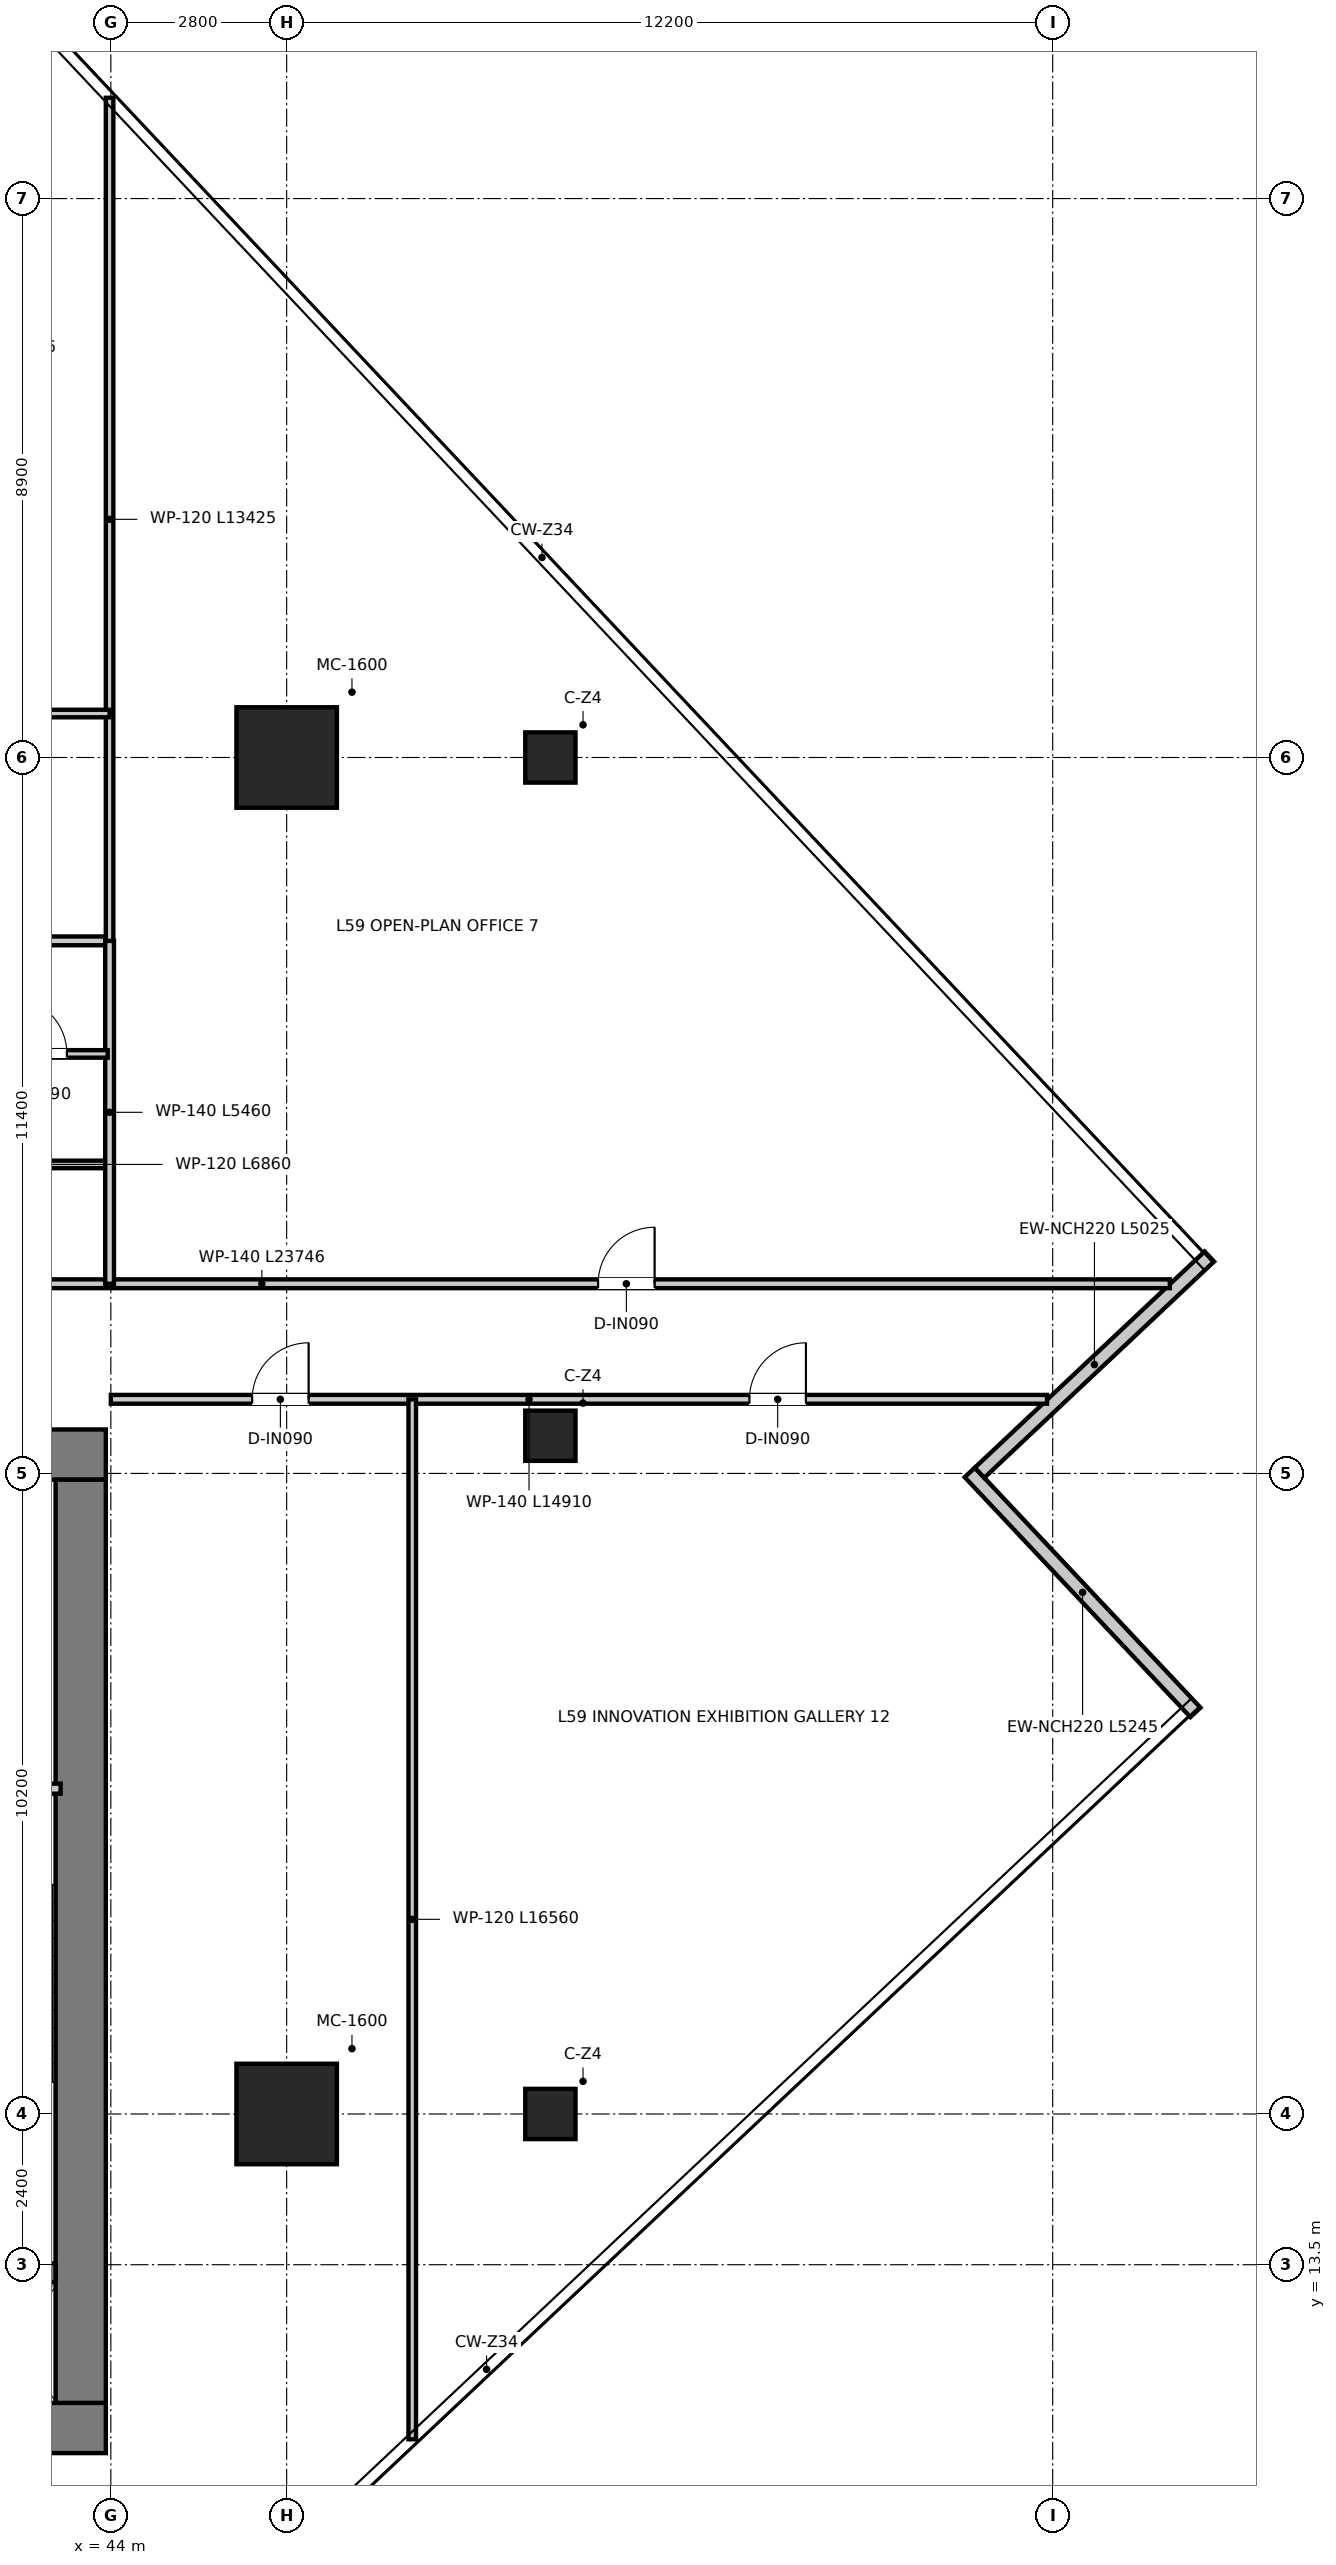
"""IFC4 building model, lengths in metres.
Left out: names, types, materials, properties, quantities, classifications, styles, units other than length and angle.
Written with IfcOpenShell. Run it as: python <this file> out.ifc"""

import sys

from ifc_helpers import new_model, si_unit, direction, frame, frame_2d, origin, origin_2d, place, context, subcontext, project, spatial, rectangle, extrude, source, transform, mapped, element, fill, save


model = new_model("IFC4")
c1 = context("Model", 3, precision=1e-05, world=origin(), true_north=direction((0.0, 1.0)))
c2 = subcontext(c1, "Body", "Model", "MODEL_VIEW")
j1 = project(units=[si_unit("LENGTHUNIT", "METRE"), si_unit("PLANEANGLEUNIT", "RADIAN")], contexts=[c1])
p1 = place(None, origin())
s1 = spatial("IfcSite", under=j1, at=p1, CompositionType="ELEMENT")
p2 = place(p1, origin())
s2 = spatial("IfcBuilding", under=s1, at=p2, CompositionType="ELEMENT")
p3 = place(p2, frame((0.0, 0.0, 242.85)))
s3 = spatial("IfcBuildingStorey", under=s2, at=p3, CompositionType="ELEMENT", Elevation=242.85)
p4 = place(p3, frame((28.08, 10.9, 0.0), z_axis=(0.0, 0.0, 1.0), x_axis=(1.0, 0.0, 0.0)))
e1 = element("IfcWall", 1, at=p4, inside=s3, PredefinedType="SHEAR", context=c2, shape_type="SweptSolid", body=[
    extrude(rectangle(XDim=15.84, YDim=0.8, at=frame_2d((7.92, 0.0))), origin(), (0.0, 0.0, 1.0), 3.95),
])
p5 = place(p3, frame((28.08, 26.4, 0.0), z_axis=(0.0, 0.0, 1.0), x_axis=(1.0, 0.0, 0.0)))
e2 = element("IfcWall", 2, at=p5, inside=s3, PredefinedType="SHEAR", context=c2, shape_type="SweptSolid", body=[
    extrude(rectangle(XDim=15.84, YDim=0.8, at=frame_2d((7.92, 0.0))), origin(), (0.0, 0.0, 1.0), 3.95),
])
p6 = place(p5, frame((7.22, 0.0, 0.0)))
e3 = element("IfcOpeningElement", 3, at=p6, cuts=e2, PredefinedType="OPENING", context=c2, shape_type="SweptSolid", body=[
    extrude(rectangle(XDim=1.4, YDim=2.2, at=frame_2d((0.7, 1.1))), frame((0.0, 0.41, 0.0), z_axis=(0.0, -1.0, 0.0), x_axis=(1.0, 0.0, 0.0)), (0.0, 0.0, 1.0), 0.82),
])
p7 = place(p5, frame((1.775, 0.0, 0.0)))
e4 = element("IfcOpeningElement", 4, at=p7, cuts=e2, PredefinedType="OPENING", context=c2, shape_type="SweptSolid", body=[
    extrude(rectangle(XDim=1.05, YDim=2.1, at=frame_2d((0.525, 1.05))), frame((0.0, 0.41, 0.0), z_axis=(0.0, -1.0, 0.0), x_axis=(1.0, 0.0, 0.0)), (0.0, 0.0, 1.0), 0.82),
])
p8 = place(p5, frame((13.015, 0.0, 0.0)))
e5 = element("IfcOpeningElement", 5, at=p8, cuts=e2, PredefinedType="OPENING", context=c2, shape_type="SweptSolid", body=[
    extrude(rectangle(XDim=1.05, YDim=2.1, at=frame_2d((0.525, 1.05))), frame((0.0, 0.41, 0.0), z_axis=(0.0, -1.0, 0.0), x_axis=(1.0, 0.0, 0.0)), (0.0, 0.0, 1.0), 0.82),
])
p9 = place(p3, frame((43.52, 11.3, 0.0), z_axis=(0.0, 0.0, 1.0), x_axis=(0.0, 1.0, 0.0)))
e6 = element("IfcWall", 6, at=p9, inside=s3, PredefinedType="SHEAR", context=c2, shape_type="SweptSolid", body=[
    extrude(rectangle(XDim=14.7, YDim=0.8, at=frame_2d((7.35, 0.0))), origin(), (0.0, 0.0, 1.0), 3.95),
])
p10 = place(p3, frame((40.02, 13.37, 0.0), z_axis=(0.0, 0.0, 1.0), x_axis=(1.0, 0.0, 0.0)))
e7 = element("IfcWall", 7, at=p10, inside=s3, PredefinedType="SHEAR", context=c2, shape_type="SweptSolid", body=[
    extrude(rectangle(XDim=3.1, YDim=0.3, at=frame_2d((1.55, 0.0))), origin(), (0.0, 0.0, 1.0), 3.95),
])
m1 = source(origin(), c2, "Body", "SweptSolid", [
    extrude(rectangle(XDim=1.6, YDim=1.6, at=origin_2d()), origin(), (0.0, 0.0, 1.0), 3.95),
])
for number, where, z_axis, x_axis in (
    (8, (46.8, 15.9, 0.0), (0.0, 0.0, 1.0), (1.0, 0.0, 0.0)),
    (9, (46.8, 37.5, 0.0), (0.0, 0.0, 1.0), (1.0, 0.0, 0.0)),
):
    element("IfcColumn", number, at=place(p3, frame(where, z_axis=z_axis, x_axis=x_axis)), inside=s3, PredefinedType="USERDEFINED", context=c2, shape_type="MappedRepresentation", body=[
        mapped(m1, transform((0.0, 0.0, 0.0), x_axis=(1.0, 0.0, 0.0), y_axis=(0.0, 1.0, 0.0), z_axis=(0.0, 0.0, 1.0), scale=1.0)),
    ])
m2 = source(origin(), c2, "Body", "SweptSolid", [
    extrude(rectangle(XDim=0.8, YDim=0.8, at=origin_2d()), origin(), (0.0, 0.0, 1.0), 3.95),
])
for number, where, z_axis, x_axis in (
    (10, (51.0, 37.5, 0.0), (0.0, 0.0, 1.0), (1.0, 0.0, 0.0)),
    (11, (51.0, 26.7, 0.0), (0.0, 0.0, 1.0), (1.0, 0.0, 0.0)),
    (12, (51.0, 15.9, 0.0), (0.0, 0.0, 1.0), (1.0, 0.0, 0.0)),
):
    element("IfcColumn", number, at=place(p3, frame(where, z_axis=z_axis, x_axis=x_axis)), inside=s3, PredefinedType="COLUMN", context=c2, shape_type="MappedRepresentation", body=[
        mapped(m2, transform((0.0, 0.0, 0.0), x_axis=(1.0, 0.0, 0.0), y_axis=(0.0, 1.0, 0.0), z_axis=(0.0, 0.0, 1.0), scale=1.0)),
    ])
p11 = place(p3, frame((61.273, 22.295, 0.0), z_axis=(0.0, 0.0, 1.0), x_axis=(-0.685178828418, 0.728374884992, 0.0)))
e13 = element("IfcWall", 13, at=p11, inside=s3, PredefinedType="ELEMENTEDWALL", context=c2, shape_type="SweptSolid", body=[
    extrude(rectangle(XDim=5.245, YDim=0.22, at=frame_2d((2.623, 0.0))), origin(), (0.0, 0.0, 1.0), 3.67),
])
p12 = place(p3, frame((57.835, 26.111, 0.0), z_axis=(0.0, 0.0, 1.0), x_axis=(0.728372554527, 0.685181305796, 0.0)))
e14 = element("IfcWall", 14, at=p12, inside=s3, PredefinedType="ELEMENTEDWALL", context=c2, shape_type="SweptSolid", body=[
    extrude(rectangle(XDim=5.025, YDim=0.22, at=frame_2d((2.513, 0.0))), origin(), (0.0, 0.0, 1.0), 3.67),
])
p13 = place(p3, frame((40.04, 21.08, 0.0), z_axis=(0.0, 0.0, 1.0), x_axis=(1.0, 0.0, 0.0)))
e15 = element("IfcWall", 15, at=p13, inside=s3, PredefinedType="PARTITIONING", context=c2, shape_type="SweptSolid", body=[
    extrude(rectangle(XDim=3.16, YDim=0.16, at=frame_2d((1.58, 0.0))), origin(), (0.0, 0.0, 1.0), 3.67),
])
p14 = place(p13, frame((1.055, 0.0, 0.0)))
e16 = element("IfcOpeningElement", 16, at=p14, cuts=e15, PredefinedType="OPENING", context=c2, shape_type="SweptSolid", body=[
    extrude(rectangle(XDim=1.05, YDim=2.1, at=frame_2d((0.525, 1.05))), frame((0.0, 0.09, 0.0), z_axis=(0.0, -1.0, 0.0), x_axis=(1.0, 0.0, 0.0)), (0.0, 0.0, 1.0), 0.18),
])
p15 = place(p3, frame((37.12, 29.12, 0.0), z_axis=(0.0, 0.0, 1.0), x_axis=(1.0, 0.0, 0.0)))
e17 = element("IfcWall", 17, at=p15, inside=s3, PredefinedType="PARTITIONING", context=c2, shape_type="SweptSolid", body=[
    extrude(rectangle(XDim=23.746, YDim=0.14, at=frame_2d((11.873, 0.0))), origin(), (0.0, 0.0, 1.0), 3.03),
])
p16 = place(p15, frame((3.03, 0.0, 0.0)))
e18 = element("IfcOpeningElement", 18, at=p16, cuts=e17, PredefinedType="OPENING", context=c2, shape_type="SweptSolid", body=[
    extrude(rectangle(XDim=0.9, YDim=2.1, at=frame_2d((0.45, 1.05))), frame((0.0, 0.08, 0.0), z_axis=(0.0, -1.0, 0.0), x_axis=(1.0, 0.0, 0.0)), (0.0, 0.0, 1.0), 0.16),
])
p17 = place(p15, frame((14.64, 0.0, 0.0)))
e19 = element("IfcOpeningElement", 19, at=p17, cuts=e17, PredefinedType="OPENING", context=c2, shape_type="SweptSolid", body=[
    extrude(rectangle(XDim=0.9, YDim=2.1, at=frame_2d((0.45, 1.05))), frame((0.0, 0.08, 0.0), z_axis=(0.0, -1.0, 0.0), x_axis=(1.0, 0.0, 0.0)), (0.0, 0.0, 1.0), 0.16),
])
p18 = place(p3, frame((44.0, 27.28, 0.0), z_axis=(0.0, 0.0, 1.0), x_axis=(1.0, 0.0, 0.0)))
e20 = element("IfcWall", 20, at=p18, inside=s3, PredefinedType="PARTITIONING", context=c2, shape_type="SweptSolid", body=[
    extrude(rectangle(XDim=14.91, YDim=0.14, at=frame_2d((7.455, 0.0))), origin(), (0.0, 0.0, 1.0), 3.03),
])
p19 = place(p18, frame((2.25, 0.0, 0.0)))
e21 = element("IfcOpeningElement", 21, at=p19, cuts=e20, PredefinedType="OPENING", context=c2, shape_type="SweptSolid", body=[
    extrude(rectangle(XDim=0.9, YDim=2.1, at=frame_2d((0.45, 1.05))), frame((0.0, 0.08, 0.0), z_axis=(0.0, -1.0, 0.0), x_axis=(1.0, 0.0, 0.0)), (0.0, 0.0, 1.0), 0.16),
])
p20 = place(p18, frame((10.17, 0.0, 0.0)))
e22 = element("IfcOpeningElement", 22, at=p20, cuts=e20, PredefinedType="OPENING", context=c2, shape_type="SweptSolid", body=[
    extrude(rectangle(XDim=0.9, YDim=2.1, at=frame_2d((0.45, 1.05))), frame((0.0, 0.08, 0.0), z_axis=(0.0, -1.0, 0.0), x_axis=(1.0, 0.0, 0.0)), (0.0, 0.0, 1.0), 0.16),
])
p21 = place(p3, frame((37.12, 31.02, 0.0), z_axis=(0.0, 0.0, 1.0), x_axis=(1.0, 0.0, 0.0)))
e23 = element("IfcWall", 23, at=p21, inside=s3, PredefinedType="PARTITIONING", context=c2, shape_type="SweptSolid", body=[
    extrude(rectangle(XDim=6.86, YDim=0.12, at=frame_2d((3.43, 0.0))), origin(), (0.0, 0.0, 1.0), 3.18),
])
p22 = place(p3, frame((37.12, 34.58, 0.0), z_axis=(0.0, 0.0, 1.0), x_axis=(1.0, 0.0, 0.0)))
e24 = element("IfcWall", 24, at=p22, inside=s3, PredefinedType="PARTITIONING", context=c2, shape_type="SweptSolid", body=[
    extrude(rectangle(XDim=6.86, YDim=0.14, at=frame_2d((3.43, 0.0))), origin(), (0.0, 0.0, 1.0), 3.18),
])
p23 = place(p3, frame((43.98, 29.12, 0.0), z_axis=(0.0, 0.0, 1.0), x_axis=(0.0, 1.0, 0.0)))
e25 = element("IfcWall", 25, at=p23, inside=s3, PredefinedType="PARTITIONING", context=c2, shape_type="SweptSolid", body=[
    extrude(rectangle(XDim=5.46, YDim=0.14, at=frame_2d((2.73, 0.0))), origin(), (0.0, 0.0, 1.0), 3.37),
])
p24 = place(p3, frame((37.15, 32.78, 0.0), z_axis=(0.0, 0.0, 1.0), x_axis=(1.0, 0.0, 0.0)))
e26 = element("IfcWall", 26, at=p24, inside=s3, PredefinedType="PARTITIONING", context=c2, shape_type="SweptSolid", body=[
    extrude(rectangle(XDim=6.8, YDim=0.12, at=frame_2d((3.4, 0.0))), origin(), (0.0, 0.0, 1.0), 3.18),
])
p25 = place(p24, frame((0.725, 0.0, 0.0)))
e27 = element("IfcOpeningElement", 27, at=p25, cuts=e26, PredefinedType="OPENING", context=c2, shape_type="SweptSolid", body=[
    extrude(rectangle(XDim=0.85, YDim=2.1, at=frame_2d((0.425, 1.05))), frame((0.0, 0.07, 0.0), z_axis=(0.0, -1.0, 0.0), x_axis=(1.0, 0.0, 0.0)), (0.0, 0.0, 1.0), 0.14),
])
p26 = place(p24, frame((3.065, 0.0, 0.0)))
e28 = element("IfcOpeningElement", 28, at=p26, cuts=e26, PredefinedType="OPENING", context=c2, shape_type="SweptSolid", body=[
    extrude(rectangle(XDim=0.85, YDim=2.1, at=frame_2d((0.425, 1.05))), frame((0.0, 0.07, 0.0), z_axis=(0.0, -1.0, 0.0), x_axis=(1.0, 0.0, 0.0)), (0.0, 0.0, 1.0), 0.14),
])
p27 = place(p24, frame((5.25, 0.0, 0.0)))
e29 = element("IfcOpeningElement", 29, at=p27, cuts=e26, PredefinedType="OPENING", context=c2, shape_type="SweptSolid", body=[
    extrude(rectangle(XDim=0.9, YDim=2.1, at=frame_2d((0.45, 1.05))), frame((0.0, 0.07, 0.0), z_axis=(0.0, -1.0, 0.0), x_axis=(1.0, 0.0, 0.0)), (0.0, 0.0, 1.0), 0.14),
])
p28 = place(p3, frame((43.98, 34.58, 0.0), z_axis=(0.0, 0.0, 1.0), x_axis=(0.0, 1.0, 0.0)))
e30 = element("IfcWall", 30, at=p28, inside=s3, PredefinedType="PARTITIONING", context=c2, shape_type="SweptSolid", body=[
    extrude(rectangle(XDim=13.425, YDim=0.12, at=frame_2d((6.712, 0.0))), origin(), (0.0, 0.0, 1.0), 3.03),
])
p29 = place(p3, frame((37.12, 38.2, 0.0), z_axis=(0.0, 0.0, 1.0), x_axis=(1.0, 0.0, 0.0)))
e31 = element("IfcWall", 31, at=p29, inside=s3, PredefinedType="PARTITIONING", context=c2, shape_type="SweptSolid", body=[
    extrude(rectangle(XDim=6.86, YDim=0.12, at=frame_2d((3.43, 0.0))), origin(), (0.0, 0.0, 1.0), 3.18),
])
p30 = place(p3, frame((48.8, 10.719, 0.0), z_axis=(0.0, 0.0, 1.0), x_axis=(0.0, 1.0, 0.0)))
e32 = element("IfcWall", 32, at=p30, inside=s3, PredefinedType="PARTITIONING", context=c2, shape_type="SweptSolid", body=[
    extrude(rectangle(XDim=16.561, YDim=0.12, at=frame_2d((8.28, 0.0))), origin(), (0.0, 0.0, 1.0), 3.18),
])
p31 = place(p27, origin())
e33 = element("IfcDoor", 33, at=p31, inside=s3, OperationType="SINGLE_SWING_LEFT", PredefinedType="DOOR", context=c2, shape_type="SweptSolid", body=[
    extrude(rectangle(XDim=0.9, YDim=2.1, at=frame_2d((0.45, 1.05))), frame((0.0, 0.025, 0.0), z_axis=(0.0, -1.0, 0.0), x_axis=(1.0, 0.0, 0.0)), (0.0, 0.0, 1.0), 0.05),
])
fill(e29, e33)
p32 = place(p17, origin())
e34 = element("IfcDoor", 34, at=p32, inside=s3, OperationType="SINGLE_SWING_RIGHT", PredefinedType="DOOR", context=c2, shape_type="SweptSolid", body=[
    extrude(rectangle(XDim=0.9, YDim=2.1, at=frame_2d((0.45, 1.05))), frame((0.0, 0.025, 0.0), z_axis=(0.0, -1.0, 0.0), x_axis=(1.0, 0.0, 0.0)), (0.0, 0.0, 1.0), 0.05),
])
fill(e19, e34)
p33 = place(p19, origin())
e35 = element("IfcDoor", 35, at=p33, inside=s3, OperationType="SINGLE_SWING_RIGHT", PredefinedType="DOOR", context=c2, shape_type="SweptSolid", body=[
    extrude(rectangle(XDim=0.9, YDim=2.1, at=frame_2d((0.45, 1.05))), frame((0.0, 0.025, 0.0), z_axis=(0.0, -1.0, 0.0), x_axis=(1.0, 0.0, 0.0)), (0.0, 0.0, 1.0), 0.05),
])
fill(e21, e35)
p34 = place(p20, origin())
e36 = element("IfcDoor", 36, at=p34, inside=s3, OperationType="SINGLE_SWING_RIGHT", PredefinedType="DOOR", context=c2, shape_type="SweptSolid", body=[
    extrude(rectangle(XDim=0.9, YDim=2.1, at=frame_2d((0.45, 1.05))), frame((0.0, 0.025, 0.0), z_axis=(0.0, -1.0, 0.0), x_axis=(1.0, 0.0, 0.0)), (0.0, 0.0, 1.0), 0.05),
])
fill(e22, e36)
save(model, sys.argv[1])
